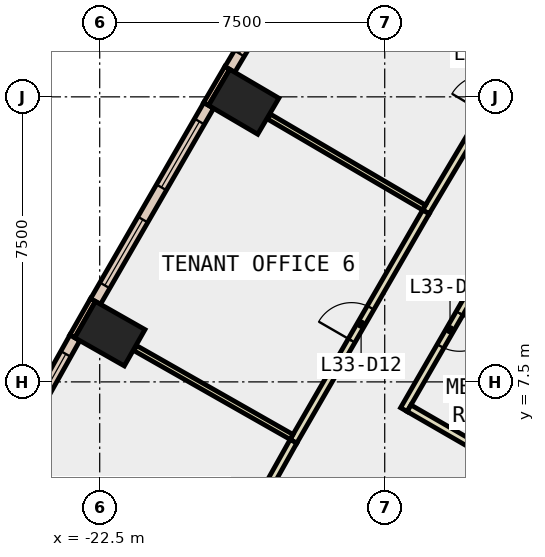
"""IFC4 building model, lengths in metres.
Left out: names, types, materials, properties, quantities, classifications, styles, units other than length and angle.
Written with IfcOpenShell. Run it as: python <this file> out.ifc"""

import sys

from ifc_helpers import new_model, si_unit, direction, frame, frame_2d, origin, origin_2d, place, context, subcontext, project, spatial, polyline, rectangle, outline, extrude, element, fill, save


model = new_model("IFC4")
c1 = context("Model", 3, precision=1e-05, world=origin(), true_north=direction((0.0, 1.0)))
c2 = subcontext(c1, "Body", "Model", "MODEL_VIEW")
j1 = project(units=[si_unit("LENGTHUNIT", "METRE"), si_unit("PLANEANGLEUNIT", "RADIAN")], contexts=[c1])
p1 = place(None, origin())
s1 = spatial("IfcSite", under=j1, at=p1, CompositionType="ELEMENT")
p2 = place(p1, origin())
s2 = spatial("IfcBuilding", under=s1, at=p2, CompositionType="ELEMENT")
p3 = place(p2, frame((0.0, 0.0, 150.8)))
s3 = spatial("IfcBuildingStorey", under=s2, at=p3, CompositionType="ELEMENT", Elevation=150.8)
for number, where, z_axis, x_axis in (
    (1, (-18.71, 14.87, -0.4), (0.0, 0.0, 1.0), (0.506, 0.863, 0.0)),
    (2, (-22.232, 8.769, -0.4), (0.0, 0.0, 1.0), (0.494, 0.869, 0.0)),
):
    element("IfcColumn", number, at=place(p3, frame(where, z_axis=z_axis, x_axis=x_axis)), inside=s3, PredefinedType="COLUMN", context=c2, shape_type="SweptSolid", body=[
        extrude(rectangle(XDim=1.1, YDim=1.5, at=origin_2d()), origin(), (0.0, 0.0, 1.0), 4.2),
    ])
p4 = place(p3, frame((0.0, 0.0, 3.6)))
e3 = element("IfcWall", 3, at=p4, inside=s3, PredefinedType="SHEAR", context=c2, shape_type="SweptSolid", body=[
    extrude(outline(polyline([(-13.267, 3.52), (-12.575, 3.12), (-11.575, 4.852), (-12.267, 5.252), (-13.267, 3.52)])), origin(), (0.0, 0.0, 1.0), 0.2),
])
p5 = place(p3, frame((-19.143, 15.761, 0.0), z_axis=(0.0, 0.0, 1.0), x_axis=(-0.506505715302, -0.862236603472, 0.0)))
e4 = element("IfcWall", 4, at=p5, inside=s3, PredefinedType="STANDARD", context=c2, shape_type="SweptSolid", body=[
    extrude(rectangle(XDim=1.099, YDim=0.15, at=frame_2d((0.55, 0.0))), origin(), (0.0, 0.0, 1.0), 3.8),
])
p6 = place(p3, frame((-22.678, 9.655, 0.0), z_axis=(0.0, 0.0, 1.0), x_axis=(-0.494512685492, -0.869170411305, 0.0)))
e5 = element("IfcWall", 5, at=p6, inside=s3, PredefinedType="STANDARD", context=c2, shape_type="SweptSolid", body=[
    extrude(rectangle(XDim=1.1, YDim=0.15, at=frame_2d((0.55, 0.0))), origin(), (0.0, 0.0, 1.0), 3.8),
])
p7 = place(p3, frame((-16.029, 20.84, 0.0), z_axis=(0.0, 0.0, 1.0), x_axis=(-0.511455040009, -0.859310038374, 0.0)))
e6 = element("IfcWall", 6, at=p7, inside=s3, PredefinedType="STANDARD", context=c2, shape_type="SweptSolid", body=[
    extrude(rectangle(XDim=5.957, YDim=0.3, at=frame_2d((2.979, 0.0))), origin(), (0.0, 0.0, 1.0), 3.8),
])
p8 = place(p7, frame((0.489, 0.0, 0.9)))
e7 = element("IfcOpeningElement", 7, at=p8, cuts=e6, PredefinedType="OPENING", context=c2, shape_type="SweptSolid", body=[
    extrude(rectangle(XDim=2.0, YDim=2.6, at=frame_2d((1.0, 1.3))), frame((0.0, 0.16, 0.0), z_axis=(0.0, -1.0, 0.0), x_axis=(1.0, 0.0, 0.0)), (0.0, 0.0, 1.0), 0.32),
])
p9 = place(p7, frame((3.468, 0.0, 0.9)))
e8 = element("IfcOpeningElement", 8, at=p9, cuts=e6, PredefinedType="OPENING", context=c2, shape_type="SweptSolid", body=[
    extrude(rectangle(XDim=2.0, YDim=2.6, at=frame_2d((1.0, 1.3))), frame((0.0, 0.16, 0.0), z_axis=(0.0, -1.0, 0.0), x_axis=(1.0, 0.0, 0.0)), (0.0, 0.0, 1.0), 0.32),
])
p10 = place(p3, frame((-19.631, 14.774, 0.0), z_axis=(0.0, 0.0, 1.0), x_axis=(-0.500061823953, -0.865989706766, 0.0)))
e9 = element("IfcWall", 9, at=p10, inside=s3, PredefinedType="STANDARD", context=c2, shape_type="SweptSolid", body=[
    extrude(rectangle(XDim=5.957, YDim=0.3, at=frame_2d((2.979, 0.0))), origin(), (0.0, 0.0, 1.0), 3.8),
])
p11 = place(p10, frame((0.489, 0.0, 0.9)))
e10 = element("IfcOpeningElement", 10, at=p11, cuts=e9, PredefinedType="OPENING", context=c2, shape_type="SweptSolid", body=[
    extrude(rectangle(XDim=2.0, YDim=2.6, at=frame_2d((1.0, 1.3))), frame((0.0, 0.16, 0.0), z_axis=(0.0, -1.0, 0.0), x_axis=(1.0, 0.0, 0.0)), (0.0, 0.0, 1.0), 0.32),
])
p12 = place(p10, frame((3.468, 0.0, 0.9)))
e11 = element("IfcOpeningElement", 11, at=p12, cuts=e9, PredefinedType="OPENING", context=c2, shape_type="SweptSolid", body=[
    extrude(rectangle(XDim=2.0, YDim=2.6, at=frame_2d((1.0, 1.3))), frame((0.0, 0.16, 0.0), z_axis=(0.0, -1.0, 0.0), x_axis=(1.0, 0.0, 0.0)), (0.0, 0.0, 1.0), 0.32),
])
p13 = place(p3, frame((-23.153, 8.661, 0.0), z_axis=(0.0, 0.0, 1.0), x_axis=(-0.488354983501, -0.872645065356, 0.0)))
e12 = element("IfcWall", 12, at=p13, inside=s3, PredefinedType="STANDARD", context=c2, shape_type="SweptSolid", body=[
    extrude(rectangle(XDim=5.957, YDim=0.3, at=frame_2d((2.978, 0.0))), origin(), (0.0, 0.0, 1.0), 3.8),
])
p14 = place(p13, frame((0.489, 0.0, 0.9)))
e13 = element("IfcOpeningElement", 13, at=p14, cuts=e12, PredefinedType="OPENING", context=c2, shape_type="SweptSolid", body=[
    extrude(rectangle(XDim=2.0, YDim=2.6, at=frame_2d((1.0, 1.3))), frame((0.0, 0.16, 0.0), z_axis=(0.0, -1.0, 0.0), x_axis=(1.0, 0.0, 0.0)), (0.0, 0.0, 1.0), 0.32),
])
p15 = place(p13, frame((3.467, 0.0, 0.9)))
e14 = element("IfcOpeningElement", 14, at=p15, cuts=e12, PredefinedType="OPENING", context=c2, shape_type="SweptSolid", body=[
    extrude(rectangle(XDim=2.0, YDim=2.6, at=frame_2d((1.0, 1.3))), frame((0.0, 0.16, 0.0), z_axis=(0.0, -1.0, 0.0), x_axis=(1.0, 0.0, 0.0)), (0.0, 0.0, 1.0), 0.32),
])
p16 = place(p3, frame((-12.067, 10.975, 0.0), z_axis=(0.0, 0.0, 1.0), x_axis=(-0.500215616273, -0.865900881878, 0.0)))
e15 = element("IfcWall", 15, at=p16, inside=s3, PredefinedType="PARTITIONING", context=c2, shape_type="SweptSolid", body=[
    extrude(rectangle(XDim=4.856, YDim=0.2, at=frame_2d((2.428, 0.0))), origin(), (0.0, 0.0, 1.0), 3.8),
])
p17 = place(p16, frame((1.928, 0.0, 0.0)))
e16 = element("IfcOpeningElement", 16, at=p17, cuts=e15, PredefinedType="OPENING", context=c2, shape_type="SweptSolid", body=[
    extrude(rectangle(XDim=1.0, YDim=2.1, at=frame_2d((0.5, 1.05))), frame((0.0, 0.11, 0.0), z_axis=(0.0, -1.0, 0.0), x_axis=(1.0, 0.0, 0.0)), (0.0, 0.0, 1.0), 0.22),
])
p18 = place(p3, frame((-14.359, 6.806, 0.0), z_axis=(0.0, 0.0, 1.0), x_axis=(0.866155875717, -0.499773947861, 0.0)))
e17 = element("IfcWall", 17, at=p18, inside=s3, PredefinedType="PARTITIONING", context=c2, shape_type="SweptSolid", body=[
    extrude(rectangle(XDim=2.189, YDim=0.2, at=frame_2d((1.094, 0.0))), origin(), (0.0, 0.0, 1.0), 3.8),
])
p19 = place(p3, frame((-13.917, 11.973, 0.0), z_axis=(0.0, 0.0, 1.0), x_axis=(0.511455840413, 0.859309561978, 0.0)))
e18 = element("IfcWall", 18, at=p19, inside=s3, PredefinedType="PARTITIONING", context=c2, shape_type="SweptSolid", body=[
    extrude(rectangle(XDim=7.047, YDim=0.2, at=frame_2d((3.523, 0.0))), origin(), (0.0, 0.0, 1.0), 3.8),
])
p20 = place(p19, frame((3.023, 0.0, 0.0)))
e19 = element("IfcOpeningElement", 19, at=p20, cuts=e18, PredefinedType="OPENING", context=c2, shape_type="SweptSolid", body=[
    extrude(rectangle(XDim=1.0, YDim=2.1, at=frame_2d((0.5, 1.05))), frame((0.0, 0.11, 0.0), z_axis=(0.0, -1.0, 0.0), x_axis=(1.0, 0.0, 0.0)), (0.0, 0.0, 1.0), 0.22),
])
p21 = place(p3, frame((-17.402, 5.936, 0.0), z_axis=(0.0, 0.0, 1.0), x_axis=(0.500135788517, 0.865946992052, 0.0)))
e20 = element("IfcWall", 20, at=p21, inside=s3, PredefinedType="PARTITIONING", context=c2, shape_type="SweptSolid", body=[
    extrude(rectangle(XDim=6.97, YDim=0.2, at=frame_2d((3.485, 0.0))), origin(), (0.0, 0.0, 1.0), 3.8),
])
p22 = place(p21, frame((3.06, 0.0, 0.0)))
e21 = element("IfcOpeningElement", 21, at=p22, cuts=e20, PredefinedType="OPENING", context=c2, shape_type="SweptSolid", body=[
    extrude(rectangle(XDim=1.0, YDim=2.1, at=frame_2d((0.5, 1.05))), frame((0.0, 0.11, 0.0), z_axis=(0.0, -1.0, 0.0), x_axis=(1.0, 0.0, 0.0)), (0.0, 0.0, 1.0), 0.22),
])
p23 = place(p3, frame((-20.769, -0.082, 0.0), z_axis=(0.0, 0.0, 1.0), x_axis=(0.488387759141, 0.872626722443, 0.0)))
e22 = element("IfcWall", 22, at=p23, inside=s3, PredefinedType="PARTITIONING", context=c2, shape_type="SweptSolid", body=[
    extrude(rectangle(XDim=6.896, YDim=0.2, at=frame_2d((3.448, 0.0))), origin(), (0.0, 0.0, 1.0), 3.8),
])
p24 = place(p3, frame((-13.965, 12.088, 0.0), z_axis=(0.0, 0.0, 1.0), x_axis=(-0.862617990649, 0.50585591052, 0.0)))
e23 = element("IfcWall", 23, at=p24, inside=s3, PredefinedType="PARTITIONING", context=c2, shape_type="SweptSolid", body=[
    extrude(rectangle(XDim=4.731, YDim=0.15, at=frame_2d((2.365, 0.0))), origin(), (0.0, 0.0, 1.0), 3.8),
])
p25 = place(p3, frame((-17.451, 6.051, 0.0), z_axis=(0.0, 0.0, 1.0), x_axis=(-0.869409691741, 0.494091882049, 0.0)))
e24 = element("IfcWall", 24, at=p25, inside=s3, PredefinedType="PARTITIONING", context=c2, shape_type="SweptSolid", body=[
    extrude(rectangle(XDim=4.73, YDim=0.15, at=frame_2d((2.365, 0.0))), origin(), (0.0, 0.0, 1.0), 3.8),
])
p26 = place(p3, frame((-12.18, 5.202, 0.0), z_axis=(0.0, 0.0, 1.0), x_axis=(-0.50002537861, -0.866010750942, 0.0)))
e25 = element("IfcWall", 25, at=p26, inside=s3, PredefinedType="PARTITIONING", context=c2, shape_type="SweptSolid", body=[
    extrude(rectangle(XDim=2.0, YDim=0.2, at=frame_2d((1.0, 0.0))), origin(), (0.0, 0.0, 1.0), 2.4),
])
p27 = place(p26, frame((0.19, 0.0, 0.0)))
e26 = element("IfcOpeningElement", 26, at=p27, cuts=e25, PredefinedType="OPENING", context=c2, shape_type="SweptSolid", body=[
    extrude(rectangle(XDim=1.8, YDim=2.1, at=frame_2d((0.9, 1.05))), frame((0.0, 0.11, 0.0), z_axis=(0.0, -1.0, 0.0), x_axis=(1.0, 0.0, 0.0)), (0.0, 0.0, 1.0), 0.22),
])
p28 = place(p9, origin())
e27 = element("IfcWindow", 27, at=p28, inside=s3, PartitioningType="SINGLE_PANEL", PredefinedType="WINDOW", context=c2, shape_type="SweptSolid", body=[
    extrude(rectangle(XDim=2.0, YDim=2.6, at=frame_2d((1.0, 1.3))), frame((0.0, 0.03, 0.0), z_axis=(0.0, -1.0, 0.0), x_axis=(1.0, 0.0, 0.0)), (0.0, 0.0, 1.0), 0.06),
])
fill(e8, e27)
p29 = place(p11, origin())
e28 = element("IfcWindow", 28, at=p29, inside=s3, PartitioningType="SINGLE_PANEL", PredefinedType="WINDOW", context=c2, shape_type="SweptSolid", body=[
    extrude(rectangle(XDim=2.0, YDim=2.6, at=frame_2d((1.0, 1.3))), frame((0.0, 0.03, 0.0), z_axis=(0.0, -1.0, 0.0), x_axis=(1.0, 0.0, 0.0)), (0.0, 0.0, 1.0), 0.06),
])
fill(e10, e28)
p30 = place(p12, origin())
e29 = element("IfcWindow", 29, at=p30, inside=s3, PartitioningType="SINGLE_PANEL", PredefinedType="WINDOW", context=c2, shape_type="SweptSolid", body=[
    extrude(rectangle(XDim=2.0, YDim=2.6, at=frame_2d((1.0, 1.3))), frame((0.0, 0.03, 0.0), z_axis=(0.0, -1.0, 0.0), x_axis=(1.0, 0.0, 0.0)), (0.0, 0.0, 1.0), 0.06),
])
fill(e11, e29)
p31 = place(p14, origin())
e30 = element("IfcWindow", 30, at=p31, inside=s3, PartitioningType="SINGLE_PANEL", PredefinedType="WINDOW", context=c2, shape_type="SweptSolid", body=[
    extrude(rectangle(XDim=2.0, YDim=2.6, at=frame_2d((1.0, 1.3))), frame((0.0, 0.03, 0.0), z_axis=(0.0, -1.0, 0.0), x_axis=(1.0, 0.0, 0.0)), (0.0, 0.0, 1.0), 0.06),
])
fill(e13, e30)
p32 = place(p22, origin())
e31 = element("IfcDoor", 31, at=p32, inside=s3, OperationType="SINGLE_SWING_LEFT", PredefinedType="DOOR", context=c2, shape_type="SweptSolid", body=[
    extrude(rectangle(XDim=1.0, YDim=2.1, at=frame_2d((0.5, 1.05))), frame((0.0, 0.025, 0.0), z_axis=(0.0, -1.0, 0.0), x_axis=(1.0, 0.0, 0.0)), (0.0, 0.0, 1.0), 0.05),
])
fill(e21, e31)
p33 = place(p17, origin())
e32 = element("IfcDoor", 32, at=p33, inside=s3, OperationType="SINGLE_SWING_LEFT", PredefinedType="DOOR", context=c2, shape_type="SweptSolid", body=[
    extrude(rectangle(XDim=1.0, YDim=2.1, at=frame_2d((0.5, 1.05))), frame((0.0, 0.025, 0.0), z_axis=(0.0, -1.0, 0.0), x_axis=(1.0, 0.0, 0.0)), (0.0, 0.0, 1.0), 0.05),
])
fill(e16, e32)
p34 = place(p27, origin())
e33 = element("IfcDoor", 33, at=p34, inside=s3, OperationType="DOUBLE_DOOR_SINGLE_SWING", PredefinedType="DOOR", context=c2, shape_type="SweptSolid", body=[
    extrude(rectangle(XDim=1.8, YDim=2.1, at=frame_2d((0.9, 1.05))), frame((0.0, 0.025, 0.0), z_axis=(0.0, -1.0, 0.0), x_axis=(1.0, 0.0, 0.0)), (0.0, 0.0, 1.0), 0.05),
])
fill(e26, e33)
save(model, sys.argv[1])
